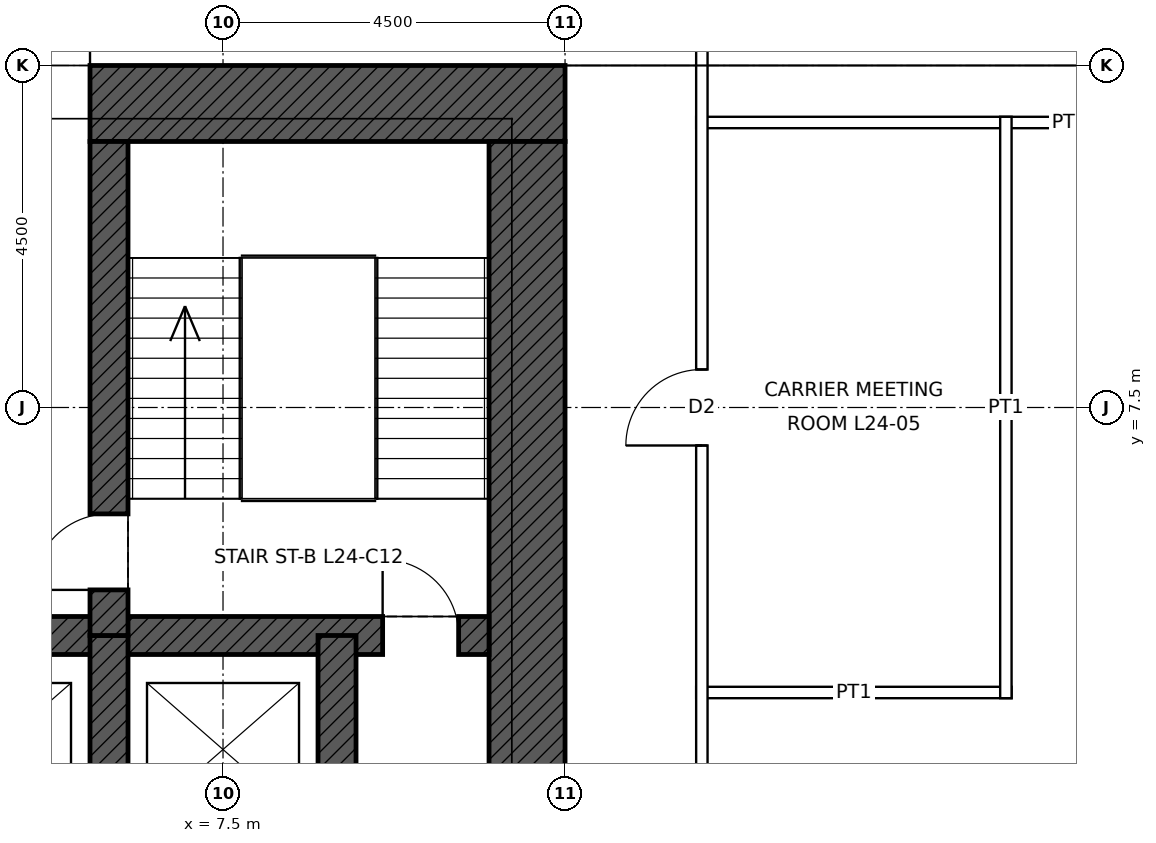
"""IFC4 building model, lengths in metres.
Left out: names, types, materials, properties, quantities, classifications, styles, units other than length and angle.
Written with IfcOpenShell. Run it as: python <this file> out.ifc"""

import sys

from ifc_helpers import new_model, si_unit, direction, frame, frame_2d, origin, place, context, subcontext, project, spatial, rectangle, extrude, element, fill, save


model = new_model("IFC4")
c1 = context("Model", 3, precision=1e-05, world=origin(), true_north=direction((0.0, 1.0)))
c2 = subcontext(c1, "Body", "Model", "MODEL_VIEW")
j1 = project(units=[si_unit("LENGTHUNIT", "METRE"), si_unit("PLANEANGLEUNIT", "RADIAN")], contexts=[c1])
p1 = place(None, origin())
s1 = spatial("IfcSite", under=j1, at=p1, CompositionType="ELEMENT")
p2 = place(p1, origin())
s2 = spatial("IfcBuilding", under=s1, at=p2, CompositionType="ELEMENT")
p3 = place(p2, frame((0.0, 0.0, 122.4)))
s3 = spatial("IfcBuildingStorey", under=s2, at=p3, CompositionType="ELEMENT", Elevation=122.4)
p4 = place(p3, frame((-12.0, 11.5, 0.0), z_axis=(0.0, 0.0, 1.0), x_axis=(1.0, 0.0, 0.0)))
e1 = element("IfcWall", 1, at=p4, inside=s3, PredefinedType="SHEAR", context=c2, shape_type="SweptSolid", body=[
    extrude(rectangle(XDim=24.0, YDim=1.0, at=frame_2d((12.0, 0.0))), origin(), (0.0, 0.0, 1.0), 4.5),
])
p5 = place(p4, frame((6.25, 0.0, 0.0)))
e2 = element("IfcOpeningElement", 2, at=p5, cuts=e1, PredefinedType="OPENING", context=c2, shape_type="SweptSolid", body=[
    extrude(rectangle(XDim=1.0, YDim=2.4, at=frame_2d((0.5, 1.2))), frame((0.0, 0.51, 0.0), z_axis=(0.0, -1.0, 0.0), x_axis=(1.0, 0.0, 0.0)), (0.0, 0.0, 1.0), 1.02),
])
p6 = place(p4, frame((16.75, 0.0, 0.0)))
e3 = element("IfcOpeningElement", 3, at=p6, cuts=e1, PredefinedType="OPENING", context=c2, shape_type="SweptSolid", body=[
    extrude(rectangle(XDim=1.0, YDim=2.4, at=frame_2d((0.5, 1.2))), frame((0.0, 0.51, 0.0), z_axis=(0.0, -1.0, 0.0), x_axis=(1.0, 0.0, 0.0)), (0.0, 0.0, 1.0), 1.02),
])
p7 = place(p3, frame((11.5, 11.0, 0.0), z_axis=(0.0, 0.0, 1.0), x_axis=(0.0, -1.0, 0.0)))
e4 = element("IfcWall", 4, at=p7, inside=s3, PredefinedType="SHEAR", context=c2, shape_type="SweptSolid", body=[
    extrude(rectangle(XDim=22.0, YDim=1.0, at=frame_2d((11.0, 0.0))), origin(), (0.0, 0.0, 1.0), 4.5),
])
p8 = place(p7, frame((10.5, 0.0, 0.0)))
e5 = element("IfcOpeningElement", 5, at=p8, cuts=e4, PredefinedType="OPENING", context=c2, shape_type="SweptSolid", body=[
    extrude(rectangle(XDim=1.0, YDim=2.4, at=frame_2d((0.5, 1.2))), frame((0.0, 0.51, 0.0), z_axis=(0.0, -1.0, 0.0), x_axis=(1.0, 0.0, 0.0)), (0.0, 0.0, 1.0), 1.02),
])
p9 = place(p3, frame((-11.0, 4.5, 0.0), z_axis=(0.0, 0.0, 1.0), x_axis=(1.0, 0.0, 0.0)))
e6 = element("IfcWall", 6, at=p9, inside=s3, PredefinedType="SHEAR", context=c2, shape_type="SweptSolid", body=[
    extrude(rectangle(XDim=22.0, YDim=0.5, at=frame_2d((11.0, 0.0))), origin(), (0.0, 0.0, 1.0), 4.5),
])
p10 = place(p9, frame((0.4, 0.0, 0.0)))
e7 = element("IfcOpeningElement", 7, at=p10, cuts=e6, PredefinedType="OPENING", context=c2, shape_type="SweptSolid", body=[
    extrude(rectangle(XDim=1.0, YDim=2.1, at=frame_2d((0.5, 1.05))), frame((0.0, 0.26, 0.0), z_axis=(0.0, -1.0, 0.0), x_axis=(1.0, 0.0, 0.0)), (0.0, 0.0, 1.0), 0.52),
])
p11 = place(p9, frame((20.6, 0.0, 0.0)))
e8 = element("IfcOpeningElement", 8, at=p11, cuts=e6, PredefinedType="OPENING", context=c2, shape_type="SweptSolid", body=[
    extrude(rectangle(XDim=1.0, YDim=2.1, at=frame_2d((0.5, 1.05))), frame((0.0, 0.26, 0.0), z_axis=(0.0, -1.0, 0.0), x_axis=(1.0, 0.0, 0.0)), (0.0, 0.0, 1.0), 0.52),
])
for number, where, z_axis, x_axis in (
    (9, (9.0, 1.5, 0.0), (0.0, 0.0, 1.0), (0.0, 1.0, 0.0)),
    (10, (6.0, 1.5, 0.0), (0.0, 0.0, 1.0), (0.0, 1.0, 0.0)),
):
    element("IfcWall", number, at=place(p3, frame(where, z_axis=z_axis, x_axis=x_axis)), inside=s3, PredefinedType="SHEAR", context=c2, shape_type="SweptSolid", body=[
        extrude(rectangle(XDim=3.0, YDim=0.5, at=frame_2d((1.5, 0.0))), origin(), (0.0, 0.0, 1.0), 4.5),
    ])
p12 = place(p3, frame((6.0, 4.5, 0.0), z_axis=(0.0, 0.0, 1.0), x_axis=(0.0, 1.0, 0.0)))
e11 = element("IfcWall", 11, at=p12, inside=s3, PredefinedType="SHEAR", context=c2, shape_type="SweptSolid", body=[
    extrude(rectangle(XDim=6.5, YDim=0.5, at=frame_2d((3.25, 0.0))), origin(), (0.0, 0.0, 1.0), 4.5),
])
p13 = place(p12, frame((0.6, 0.0, 0.0)))
e12 = element("IfcOpeningElement", 12, at=p13, cuts=e11, PredefinedType="OPENING", context=c2, shape_type="SweptSolid", body=[
    extrude(rectangle(XDim=1.0, YDim=2.1, at=frame_2d((0.5, 1.05))), frame((0.0, 0.26, 0.0), z_axis=(0.0, -1.0, 0.0), x_axis=(1.0, 0.0, 0.0)), (0.0, 0.0, 1.0), 0.52),
])
p14 = place(p3, frame((13.725, 3.75, 0.0), z_axis=(0.0, 0.0, 1.0), x_axis=(1.0, 0.0, 0.0)))
e13 = element("IfcWall", 13, at=p14, inside=s3, PredefinedType="PARTITIONING", context=c2, shape_type="SweptSolid", body=[
    extrude(rectangle(XDim=4.15, YDim=0.15, at=frame_2d((2.075, 0.0))), origin(), (0.0, 0.0, 1.0), 3.431),
])
p15 = place(p3, frame((13.725, 11.25, 0.0), z_axis=(0.0, 0.0, 1.0), x_axis=(1.0, 0.0, 0.0)))
e14 = element("IfcWall", 14, at=p15, inside=s3, PredefinedType="PARTITIONING", context=c2, shape_type="SweptSolid", body=[
    extrude(rectangle(XDim=9.825, YDim=0.15, at=frame_2d((4.913, 0.0))), origin(), (0.0, 0.0, 1.0), 3.431),
])
p16 = place(p3, frame((13.8, -13.875, 0.0), z_axis=(0.0, 0.0, 1.0), x_axis=(0.0, 1.0, 0.0)))
e15 = element("IfcWall", 15, at=p16, inside=s3, PredefinedType="PARTITIONING", context=c2, shape_type="SweptSolid", body=[
    extrude(rectangle(XDim=27.75, YDim=0.15, at=frame_2d((13.875, 0.0))), origin(), (0.0, 0.0, 1.0), 4.3),
])
p17 = place(p16, frame((20.875, 0.0, 0.0)))
e16 = element("IfcOpeningElement", 16, at=p17, cuts=e15, PredefinedType="OPENING", context=c2, shape_type="SweptSolid", body=[
    extrude(rectangle(XDim=1.0, YDim=2.1, at=frame_2d((0.5, 1.05))), frame((0.0, 0.085, 0.0), z_axis=(0.0, -1.0, 0.0), x_axis=(1.0, 0.0, 0.0)), (0.0, 0.0, 1.0), 0.17),
])
p18 = place(p16, frame((9.225, 0.0, 0.0)))
e17 = element("IfcOpeningElement", 17, at=p18, cuts=e15, PredefinedType="OPENING", context=c2, shape_type="SweptSolid", body=[
    extrude(rectangle(XDim=1.8, YDim=2.4, at=frame_2d((0.9, 1.2))), frame((0.0, 0.085, 0.0), z_axis=(0.0, -1.0, 0.0), x_axis=(1.0, 0.0, 0.0)), (0.0, 0.0, 1.0), 0.17),
])
p19 = place(p3, frame((17.8, 3.675, 0.0), z_axis=(0.0, 0.0, 1.0), x_axis=(0.0, 1.0, 0.0)))
e18 = element("IfcWall", 18, at=p19, inside=s3, PredefinedType="PARTITIONING", context=c2, shape_type="SweptSolid", body=[
    extrude(rectangle(XDim=7.65, YDim=0.15, at=frame_2d((3.825, 0.0))), origin(), (0.0, 0.0, 1.0), 4.3),
])
p20 = place(p11, origin())
e19 = element("IfcDoor", 19, at=p20, inside=s3, OperationType="SINGLE_SWING_LEFT", PredefinedType="DOOR", context=c2, shape_type="SweptSolid", body=[
    extrude(rectangle(XDim=1.0, YDim=2.1, at=frame_2d((0.5, 1.05))), frame((0.0, 0.025, 0.0), z_axis=(0.0, -1.0, 0.0), x_axis=(1.0, 0.0, 0.0)), (0.0, 0.0, 1.0), 0.05),
])
fill(e8, e19)
p21 = place(p13, origin())
e20 = element("IfcDoor", 20, at=p21, inside=s3, OperationType="SINGLE_SWING_LEFT", PredefinedType="DOOR", context=c2, shape_type="SweptSolid", body=[
    extrude(rectangle(XDim=1.0, YDim=2.1, at=frame_2d((0.5, 1.05))), frame((0.0, 0.025, 0.0), z_axis=(0.0, -1.0, 0.0), x_axis=(1.0, 0.0, 0.0)), (0.0, 0.0, 1.0), 0.05),
])
fill(e12, e20)
p22 = place(p6, origin())
e21 = element("IfcDoor", 21, at=p22, inside=s3, OperationType="SINGLE_SWING_RIGHT", PredefinedType="DOOR", context=c2, shape_type="SweptSolid", body=[
    extrude(rectangle(XDim=1.0, YDim=2.4, at=frame_2d((0.5, 1.2))), frame((0.0, 0.485, 0.0), z_axis=(0.0, -1.0, 0.0), x_axis=(1.0, 0.0, 0.0)), (0.0, 0.0, 1.0), 0.05),
])
fill(e3, e21)
p23 = place(p17, origin())
e22 = element("IfcDoor", 22, at=p23, inside=s3, OperationType="SINGLE_SWING_LEFT", PredefinedType="DOOR", context=c2, shape_type="SweptSolid", body=[
    extrude(rectangle(XDim=1.0, YDim=2.1, at=frame_2d((0.5, 1.05))), frame((0.0, 0.025, 0.0), z_axis=(0.0, -1.0, 0.0), x_axis=(1.0, 0.0, 0.0)), (0.0, 0.0, 1.0), 0.05),
])
fill(e16, e22)
save(model, sys.argv[1])
